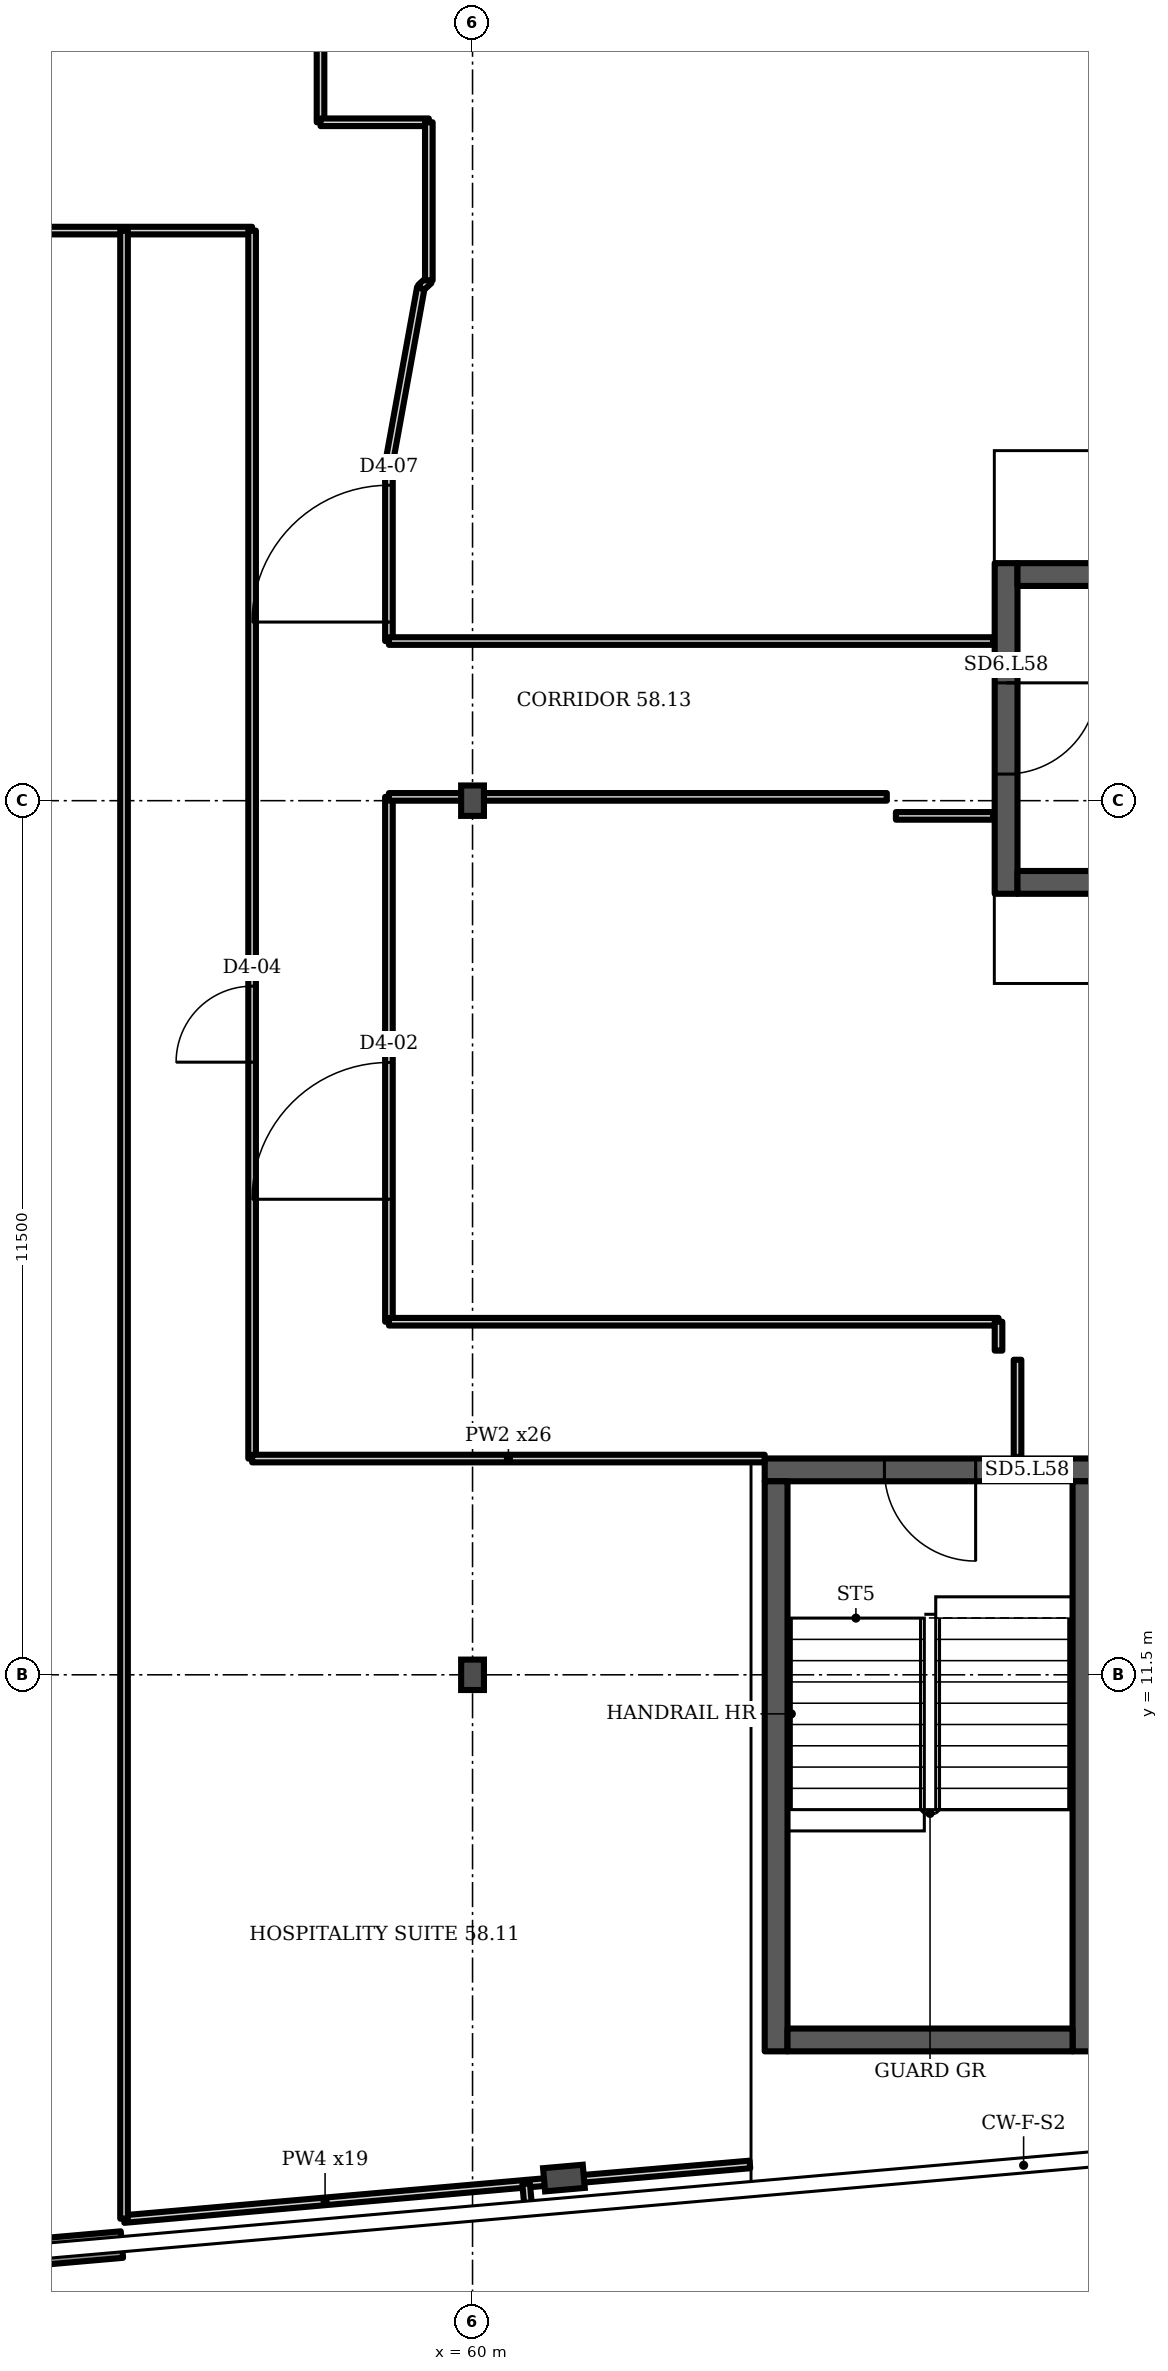
"""IFC4 building model, lengths in metres.
Left out: names, types, materials, properties, quantities, classifications, styles, units other than length and angle.
Written with IfcOpenShell. Run it as: python <this file> out.ifc"""

import sys

from ifc_helpers import new_model, si_unit, direction, frame, frame_2d, origin, origin_2d, place, context, subcontext, project, spatial, rectangle, i_section, extrude, element, fill, save


model = new_model("IFC4")
c1 = context("Model", 3, precision=1e-05, world=origin(), true_north=direction((0.0, 1.0)))
c2 = subcontext(c1, "Body", "Model", "MODEL_VIEW")
j1 = project(units=[si_unit("LENGTHUNIT", "METRE"), si_unit("PLANEANGLEUNIT", "RADIAN")], contexts=[c1])
p1 = place(None, origin())
s1 = spatial("IfcSite", under=j1, at=p1, CompositionType="ELEMENT")
p2 = place(p1, origin())
s2 = spatial("IfcBuilding", under=s1, at=p2, CompositionType="ELEMENT")
p3 = place(p2, frame((0.0, 0.0, 232.3)))
s3 = spatial("IfcBuildingStorey", under=s2, at=p3, CompositionType="ELEMENT", Elevation=232.3)
p4 = place(p3, frame((61.202, 4.879, 0.0), z_axis=(0.0, 0.0, 1.0), x_axis=(0.087156, -0.996197, 0.0)))
e1 = element("IfcColumn", 1, at=p4, inside=s3, PredefinedType="COLUMN", context=c2, shape_type="SweptSolid", body=[
    extrude(i_section(OverallWidth=0.306, OverallDepth=0.524, WebThickness=0.021, FlangeThickness=0.04, FilletRadius=0.027, at=origin_2d()), origin(), (0.0, 0.0, 1.0), 3.6),
])
for number, where, z_axis, x_axis in (
    (2, (60.0, 11.5, 0.0), (0.0, 0.0, 1.0), (1.0, 0.0, 0.0)),
    (3, (60.0, 23.0, 0.0), (0.0, 0.0, 1.0), (1.0, 0.0, 0.0)),
):
    element("IfcColumn", number, at=place(p3, frame(where, z_axis=z_axis, x_axis=x_axis)), inside=s3, PredefinedType="COLUMN", context=c2, shape_type="SweptSolid", body=[
        extrude(i_section(OverallWidth=0.3, OverallDepth=0.4, WebThickness=0.013, FlangeThickness=0.024, FilletRadius=0.027, at=origin_2d()), origin(), (0.0, 0.0, 1.0), 3.6),
    ])
p5 = place(p3, frame((49.545, 3.493, 0.0), z_axis=(0.0, 0.0, 1.0), x_axis=(0.996196, 0.087138, 0.0)))
e4 = element("IfcWall", 4, at=p5, inside=s3, PredefinedType="SOLIDWALL", context=c2, shape_type="SweptSolid", body=[
    extrude(rectangle(XDim=5.864, YDim=0.35, at=frame_2d((2.932, 0.0))), origin(), (0.0, 0.0, 1.0), 1.0),
])
p6 = place(p3, frame((63.844, 14.196, 0.0), z_axis=(0.0, 0.0, 1.0), x_axis=(1.0, 0.0, 0.0)))
e5 = element("IfcWall", 5, at=p6, inside=s3, PredefinedType="SHEAR", context=c2, shape_type="SweptSolid", body=[
    extrude(rectangle(XDim=4.35, YDim=0.3, at=frame_2d((2.175, 0.0))), origin(), (0.0, 0.0, 1.0), 3.2),
])
p7 = place(p6, frame((1.575, 0.0, 0.0)))
e6 = element("IfcOpeningElement", 6, at=p7, cuts=e5, PredefinedType="OPENING", context=c2, shape_type="SweptSolid", body=[
    extrude(rectangle(XDim=1.2, YDim=2.1, at=frame_2d((0.6, 1.05))), frame((0.0, 0.16, 0.0), z_axis=(0.0, -1.0, 0.0), x_axis=(1.0, 0.0, 0.0)), (0.0, 0.0, 1.0), 0.32),
])
p8 = place(p3, frame((67.02, 21.775, 0.0), z_axis=(0.0, 0.0, 1.0), x_axis=(0.0, 1.0, 0.0)))
e7 = element("IfcWall", 7, at=p8, inside=s3, PredefinedType="SHEAR", context=c2, shape_type="SweptSolid", body=[
    extrude(rectangle(XDim=4.35, YDim=0.3, at=frame_2d((2.175, 0.0))), origin(), (0.0, 0.0, 1.0), 3.2),
])
p9 = place(p8, frame((1.575, 0.0, 0.0)))
e8 = element("IfcOpeningElement", 8, at=p9, cuts=e7, PredefinedType="OPENING", context=c2, shape_type="SweptSolid", body=[
    extrude(rectangle(XDim=1.2, YDim=2.1, at=frame_2d((0.6, 1.05))), frame((0.0, 0.16, 0.0), z_axis=(0.0, -1.0, 0.0), x_axis=(1.0, 0.0, 0.0)), (0.0, 0.0, 1.0), 0.32),
])
p10 = place(p3, frame((44.15, 30.5, 0.0), z_axis=(0.0, 0.0, 1.0), x_axis=(1.0, 0.0, 0.0)))
e9 = element("IfcWall", 9, at=p10, inside=s3, PredefinedType="PARTITIONING", context=c2, shape_type="SweptSolid", body=[
    extrude(rectangle(XDim=12.95, YDim=0.1, at=frame_2d((6.475, 0.0))), origin(), (0.0, 0.0, 1.0), 3.2),
])
p11 = place(p10, frame((5.17, 0.0, 0.0)))
e10 = element("IfcOpeningElement", 10, at=p11, cuts=e9, PredefinedType="OPENING", context=c2, shape_type="SweptSolid", body=[
    extrude(rectangle(XDim=1.0, YDim=2.1, at=frame_2d((0.5, 1.05))), frame((0.0, 0.06, 0.0), z_axis=(0.0, -1.0, 0.0), x_axis=(1.0, 0.0, 0.0)), (0.0, 0.0, 1.0), 0.12),
])
p12 = place(p3, frame((55.415, 4.34, 0.0), z_axis=(0.0, 0.0, 1.0), x_axis=(0.996159, 0.087534, 0.0)))
e11 = element("IfcWall", 11, at=p12, inside=s3, PredefinedType="PARTITIONING", context=c2, shape_type="SweptSolid", body=[
    extrude(rectangle(XDim=5.31, YDim=0.1, at=frame_2d((2.655, 0.0))), origin(), (0.0, 0.0, 1.0), 2.58),
])
p13 = place(p3, frame((55.415, 4.345, 0.0), z_axis=(0.0, 0.0, 1.0), x_axis=(0.0, 1.0, 0.0)))
e12 = element("IfcWall", 12, at=p13, inside=s3, PredefinedType="PARTITIONING", context=c2, shape_type="SweptSolid", body=[
    extrude(rectangle(XDim=26.155, YDim=0.1, at=frame_2d((13.078, 0.0))), origin(), (0.0, 0.0, 1.0), 3.2),
])
p14 = place(p3, frame((57.1, 14.345, 0.0), z_axis=(0.0, 0.0, 1.0), x_axis=(0.0, 1.0, 0.0)))
e13 = element("IfcWall", 13, at=p14, inside=s3, PredefinedType="PARTITIONING", context=c2, shape_type="SweptSolid", body=[
    extrude(rectangle(XDim=16.155, YDim=0.1, at=frame_2d((8.078, 0.0))), origin(), (0.0, 0.0, 1.0), 3.2),
])
p15 = place(p14, frame((5.215, 0.0, 0.0)))
e14 = element("IfcOpeningElement", 14, at=p15, cuts=e13, PredefinedType="OPENING", context=c2, shape_type="SweptSolid", body=[
    extrude(rectangle(XDim=1.0, YDim=2.1, at=frame_2d((0.5, 1.05))), frame((0.0, 0.06, 0.0), z_axis=(0.0, -1.0, 0.0), x_axis=(1.0, 0.0, 0.0)), (0.0, 0.0, 1.0), 0.12),
])
p16 = place(p3, frame((57.1, 14.345, 0.0), z_axis=(0.0, 0.0, 1.0), x_axis=(1.0, 0.0, 0.0)))
e15 = element("IfcWall", 15, at=p16, inside=s3, PredefinedType="PARTITIONING", context=c2, shape_type="SweptSolid", body=[
    extrude(rectangle(XDim=6.744, YDim=0.1, at=frame_2d((3.372, 0.0))), origin(), (0.0, 0.0, 1.0), 3.2),
])
p17 = place(p3, frame((58.0, 31.925, 0.0), z_axis=(0.0, 0.0, 1.0), x_axis=(0.0, 1.0, 0.0)))
e16 = element("IfcWall", 16, at=p17, inside=s3, PredefinedType="PARTITIONING", context=c2, shape_type="SweptSolid", body=[
    extrude(rectangle(XDim=2.055, YDim=0.1, at=frame_2d((1.027, 0.0))), origin(), (0.0, 0.0, 1.0), 3.2),
])
p18 = place(p3, frame((58.0, 31.925, 0.0), z_axis=(0.0, 0.0, 1.0), x_axis=(1.0, 0.0, 0.0)))
e17 = element("IfcWall", 17, at=p18, inside=s3, PredefinedType="PARTITIONING", context=c2, shape_type="SweptSolid", body=[
    extrude(rectangle(XDim=1.425, YDim=0.1, at=frame_2d((0.712, 0.0))), origin(), (0.0, 0.0, 1.0), 3.2),
])
p19 = place(p3, frame((58.9, 16.145, 0.0), z_axis=(0.0, 0.0, 1.0), x_axis=(0.0, 1.0, 0.0)))
e18 = element("IfcWall", 18, at=p19, inside=s3, PredefinedType="PARTITIONING", context=c2, shape_type="SweptSolid", body=[
    extrude(rectangle(XDim=6.905, YDim=0.1, at=frame_2d((3.453, 0.0))), origin(), (0.0, 0.0, 1.0), 3.2),
])
p20 = place(p19, frame((1.611, 0.0, 0.0)))
e19 = element("IfcOpeningElement", 19, at=p20, cuts=e18, PredefinedType="OPENING", context=c2, shape_type="SweptSolid", body=[
    extrude(rectangle(XDim=1.8, YDim=2.1, at=frame_2d((0.9, 1.05))), frame((0.0, 0.06, 0.0), z_axis=(0.0, -1.0, 0.0), x_axis=(1.0, 0.0, 0.0)), (0.0, 0.0, 1.0), 0.12),
])
p21 = place(p3, frame((58.9, 16.145, 0.0), z_axis=(0.0, 0.0, 1.0), x_axis=(1.0, 0.0, 0.0)))
e20 = element("IfcWall", 20, at=p21, inside=s3, PredefinedType="PARTITIONING", context=c2, shape_type="SweptSolid", body=[
    extrude(rectangle(XDim=8.02, YDim=0.1, at=frame_2d((4.01, 0.0))), origin(), (0.0, 0.0, 1.0), 3.2),
])
p22 = place(p3, frame((58.9, 23.05, 0.0), z_axis=(0.0, 0.0, 1.0), x_axis=(1.0, 0.0, 0.0)))
e21 = element("IfcWall", 21, at=p22, inside=s3, PredefinedType="PARTITIONING", context=c2, shape_type="SweptSolid", body=[
    extrude(rectangle(XDim=6.55, YDim=0.1, at=frame_2d((3.275, 0.0))), origin(), (0.0, 0.0, 1.0), 3.2),
])
p23 = place(p3, frame((58.9, 25.1, 0.0), z_axis=(0.0, 0.0, 1.0), x_axis=(0.0, 1.0, 0.0)))
e22 = element("IfcWall", 22, at=p23, inside=s3, PredefinedType="PARTITIONING", context=c2, shape_type="SweptSolid", body=[
    extrude(rectangle(XDim=2.335, YDim=0.1, at=frame_2d((1.167, 0.0))), origin(), (0.0, 0.0, 1.0), 3.2),
])
p24 = place(p23, frame((0.25, 0.0, 0.0)))
e23 = element("IfcOpeningElement", 23, at=p24, cuts=e22, PredefinedType="OPENING", context=c2, shape_type="SweptSolid", body=[
    extrude(rectangle(XDim=1.8, YDim=2.1, at=frame_2d((0.9, 1.05))), frame((0.0, 0.06, 0.0), z_axis=(0.0, -1.0, 0.0), x_axis=(1.0, 0.0, 0.0)), (0.0, 0.0, 1.0), 0.12),
])
p25 = place(p3, frame((58.9, 25.1, 0.0), z_axis=(0.0, 0.0, 1.0), x_axis=(1.0, 0.0, 0.0)))
e24 = element("IfcWall", 24, at=p25, inside=s3, PredefinedType="PARTITIONING", context=c2, shape_type="SweptSolid", body=[
    extrude(rectangle(XDim=7.95, YDim=0.1, at=frame_2d((3.975, 0.0))), origin(), (0.0, 0.0, 1.0), 3.2),
])
p26 = place(p3, frame((58.9, 27.435, 0.0), z_axis=(0.0, 0.0, 1.0), x_axis=(0.178584, 0.983924, 0.0)))
e25 = element("IfcWall", 25, at=p26, inside=s3, PredefinedType="PARTITIONING", context=c2, shape_type="SweptSolid", body=[
    extrude(rectangle(XDim=2.353, YDim=0.1, at=frame_2d((1.176, 0.0))), origin(), (0.0, 0.0, 1.0), 3.2),
])
p27 = place(p3, frame((59.32, 29.75, 0.0), z_axis=(0.0, 0.0, 1.0), x_axis=(0.741581, 0.670872, 0.0)))
e26 = element("IfcWall", 26, at=p27, inside=s3, PredefinedType="PARTITIONING", context=c2, shape_type="SweptSolid", body=[
    extrude(rectangle(XDim=0.142, YDim=0.1, at=frame_2d((0.071, 0.0))), origin(), (0.0, 0.0, 1.0), 3.2),
])
p28 = place(p3, frame((59.425, 29.845, 0.0), z_axis=(0.0, 0.0, 1.0), x_axis=(0.0, 1.0, 0.0)))
e27 = element("IfcWall", 27, at=p28, inside=s3, PredefinedType="PARTITIONING", context=c2, shape_type="SweptSolid", body=[
    extrude(rectangle(XDim=2.08, YDim=0.1, at=frame_2d((1.04, 0.0))), origin(), (0.0, 0.0, 1.0), 3.2),
])
p29 = place(p3, frame((60.705, 4.805, 0.0), z_axis=(0.0, 0.0, 1.0), x_axis=(0.996324, 0.085692, 0.0)))
e28 = element("IfcWall", 28, at=p29, inside=s3, PredefinedType="PARTITIONING", context=c2, shape_type="SweptSolid", body=[
    extrude(rectangle(XDim=2.955, YDim=0.1, at=frame_2d((1.477, 0.0))), origin(), (0.0, 0.0, 1.0), 2.58),
])
p30 = place(p3, frame((60.733, 4.497, 0.0), z_axis=(0.0, 0.0, 1.0), x_axis=(-0.090037, 0.995936, 0.0)))
e29 = element("IfcWall", 29, at=p30, inside=s3, PredefinedType="PARTITIONING", context=c2, shape_type="SweptSolid", body=[
    extrude(rectangle(XDim=0.309, YDim=0.1, at=frame_2d((0.155, 0.0))), origin(), (0.0, 0.0, 1.0), 3.2),
])
p31 = place(p3, frame((65.57, 22.8, 0.0), z_axis=(0.0, 0.0, 1.0), x_axis=(1.0, 0.0, 0.0)))
e30 = element("IfcWall", 30, at=p31, inside=s3, PredefinedType="PARTITIONING", context=c2, shape_type="SweptSolid", body=[
    extrude(rectangle(XDim=1.28, YDim=0.1, at=frame_2d((0.64, 0.0))), origin(), (0.0, 0.0, 1.0), 3.2),
])
p32 = place(p3, frame((66.92, 15.765, 0.0), z_axis=(0.0, 0.0, 1.0), x_axis=(0.0, 1.0, 0.0)))
e31 = element("IfcWall", 31, at=p32, inside=s3, PredefinedType="PARTITIONING", context=c2, shape_type="SweptSolid", body=[
    extrude(rectangle(XDim=0.38, YDim=0.1, at=frame_2d((0.19, 0.0))), origin(), (0.0, 0.0, 1.0), 3.2),
])
p33 = place(p3, frame((67.17, 14.366, 0.0), z_axis=(0.0, 0.0, 1.0), x_axis=(0.0, 1.0, 0.0)))
e32 = element("IfcWall", 32, at=p33, inside=s3, PredefinedType="PARTITIONING", context=c2, shape_type="SweptSolid", body=[
    extrude(rectangle(XDim=1.279, YDim=0.1, at=frame_2d((0.639, 0.0))), origin(), (0.0, 0.0, 1.0), 3.2),
])
for number, where, z_axis, x_axis in (
    (33, (63.994, 6.546, 0.0), (0.0, 0.0, 1.0), (0.0, 1.0, 0.0)),
    (34, (68.044, 6.546, 0.0), (0.0, 0.0, 1.0), (0.0, 1.0, 0.0)),
):
    element("IfcWall", number, at=place(p3, frame(where, z_axis=z_axis, x_axis=x_axis)), inside=s3, PredefinedType="SHEAR", context=c2, shape_type="SweptSolid", body=[
        extrude(rectangle(XDim=7.5, YDim=0.3, at=frame_2d((3.75, 0.0))), origin(), (0.0, 0.0, 1.0), 3.2),
    ])
p34 = place(p3, frame((64.144, 6.696, 0.0), z_axis=(0.0, 0.0, 1.0), x_axis=(1.0, 0.0, 0.0)))
e35 = element("IfcWall", 35, at=p34, inside=s3, PredefinedType="SHEAR", context=c2, shape_type="SweptSolid", body=[
    extrude(rectangle(XDim=3.75, YDim=0.3, at=frame_2d((1.875, 0.0))), origin(), (0.0, 0.0, 1.0), 3.2),
])
for number, where, z_axis, x_axis in (
    (36, (67.17, 21.925, 0.0), (0.0, 0.0, 1.0), (1.0, 0.0, 0.0)),
    (37, (67.17, 25.975, 0.0), (0.0, 0.0, 1.0), (1.0, 0.0, 0.0)),
):
    element("IfcWall", number, at=place(p3, frame(where, z_axis=z_axis, x_axis=x_axis)), inside=s3, PredefinedType="SHEAR", context=c2, shape_type="SweptSolid", body=[
        extrude(rectangle(XDim=7.5, YDim=0.3, at=frame_2d((3.75, 0.0))), origin(), (0.0, 0.0, 1.0), 3.2),
    ])
p35 = place(p7, origin())
e38 = element("IfcDoor", 38, at=p35, inside=s3, OperationType="SINGLE_SWING_RIGHT", PredefinedType="DOOR", context=c2, shape_type="SweptSolid", body=[
    extrude(rectangle(XDim=1.2, YDim=2.1, at=frame_2d((0.6, 1.05))), frame((0.0, 0.025, 0.0), z_axis=(0.0, -1.0, 0.0), x_axis=(1.0, 0.0, 0.0)), (0.0, 0.0, 1.0), 0.05),
])
fill(e6, e38)
p36 = place(p9, origin())
e39 = element("IfcDoor", 39, at=p36, inside=s3, OperationType="SINGLE_SWING_RIGHT", PredefinedType="DOOR", context=c2, shape_type="SweptSolid", body=[
    extrude(rectangle(XDim=1.2, YDim=2.1, at=frame_2d((0.6, 1.05))), frame((0.0, 0.025, 0.0), z_axis=(0.0, -1.0, 0.0), x_axis=(1.0, 0.0, 0.0)), (0.0, 0.0, 1.0), 0.05),
])
fill(e8, e39)
p37 = place(p20, origin())
e40 = element("IfcDoor", 40, at=p37, inside=s3, OperationType="DOUBLE_DOOR_SINGLE_SWING", PredefinedType="DOOR", context=c2, shape_type="SweptSolid", body=[
    extrude(rectangle(XDim=1.8, YDim=2.1, at=frame_2d((0.9, 1.05))), frame((0.0, 0.025, 0.0), z_axis=(0.0, -1.0, 0.0), x_axis=(1.0, 0.0, 0.0)), (0.0, 0.0, 1.0), 0.05),
])
fill(e19, e40)
p38 = place(p15, origin())
e41 = element("IfcDoor", 41, at=p38, inside=s3, OperationType="SINGLE_SWING_LEFT", PredefinedType="DOOR", context=c2, shape_type="SweptSolid", body=[
    extrude(rectangle(XDim=1.0, YDim=2.1, at=frame_2d((0.5, 1.05))), frame((0.0, 0.025, 0.0), z_axis=(0.0, -1.0, 0.0), x_axis=(1.0, 0.0, 0.0)), (0.0, 0.0, 1.0), 0.05),
])
fill(e14, e41)
p39 = place(p24, origin())
e42 = element("IfcDoor", 42, at=p39, inside=s3, OperationType="DOUBLE_DOOR_SINGLE_SWING", PredefinedType="DOOR", context=c2, shape_type="SweptSolid", body=[
    extrude(rectangle(XDim=1.8, YDim=2.1, at=frame_2d((0.9, 1.05))), frame((0.0, 0.025, 0.0), z_axis=(0.0, -1.0, 0.0), x_axis=(1.0, 0.0, 0.0)), (0.0, 0.0, 1.0), 0.05),
])
fill(e23, e42)
save(model, sys.argv[1])
